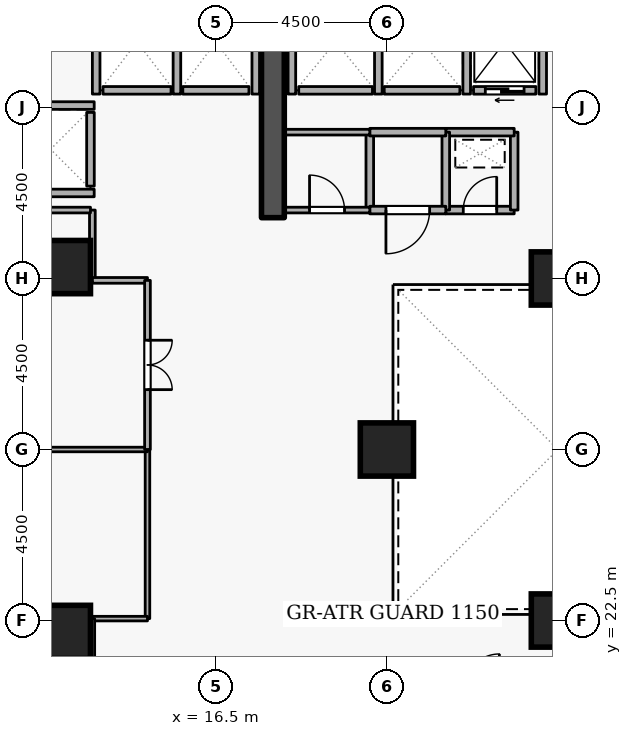
"""IFC4 building model, lengths in metres.
Left out: names, types, materials, properties, quantities, classifications, styles, units other than length and angle.
Written with IfcOpenShell. Run it as: python <this file> out.ifc"""

import sys

from ifc_helpers import new_model, si_unit, direction, frame, frame_2d, origin, origin_2d, place, context, subcontext, project, spatial, rectangle, extrude, element, fill, save


model = new_model("IFC4")
c1 = context("Model", 3, precision=1e-05, world=origin(), true_north=direction((0.0, 1.0)))
c2 = subcontext(c1, "Body", "Model", "MODEL_VIEW")
j1 = project(units=[si_unit("LENGTHUNIT", "METRE"), si_unit("PLANEANGLEUNIT", "RADIAN")], contexts=[c1])
p1 = place(None, origin())
s1 = spatial("IfcSite", under=j1, at=p1, CompositionType="ELEMENT")
p2 = place(p1, origin())
s2 = spatial("IfcBuilding", under=s1, at=p2, CompositionType="ELEMENT")
p3 = place(p2, frame((0.0, 0.0, 53.7)))
s3 = spatial("IfcBuildingStorey", under=s2, at=p3, CompositionType="ELEMENT", Elevation=53.7)
p4 = place(p3, frame((18.0, 33.1, 0.0), z_axis=(0.0, 0.0, 1.0), x_axis=(0.0, 1.0, 0.0)))
e1 = element("IfcWall", 1, at=p4, inside=s3, PredefinedType="SHEAR", context=c2, shape_type="SweptSolid", body=[
    extrude(rectangle(XDim=5.7, YDim=0.6, at=frame_2d((2.85, 0.0))), origin(), (0.0, 0.0, 1.0), 3.6),
])
for number, where, z_axis, x_axis in (
    (2, (12.5, 22.2, 0.0), (0.0, 0.0, 1.0), (1.0, 0.0, 0.0)),
    (3, (12.5, 31.8, 0.0), (0.0, 0.0, 1.0), (1.0, 0.0, 0.0)),
    (4, (25.5, 22.5, 0.0), (0.0, 0.0, 1.0), (1.0, 0.0, 0.0)),
    (5, (25.5, 31.5, 0.0), (0.0, 0.0, 1.0), (1.0, 0.0, 0.0)),
    (6, (21.0, 27.0, 0.0), (0.0, 0.0, 1.0), (1.0, 0.0, 0.0)),
):
    element("IfcColumn", number, at=place(p3, frame(where, z_axis=z_axis, x_axis=x_axis)), inside=s3, PredefinedType="COLUMN", context=c2, shape_type="SweptSolid", body=[
        extrude(rectangle(XDim=1.4, YDim=1.4, at=origin_2d()), origin(), (0.0, 0.0, 1.0), 3.6),
    ])
p5 = place(p3, frame((24.92, 36.45, 0.0), z_axis=(0.0, 0.0, 1.0), x_axis=(-1.0, 0.0, 0.0)))
e7 = element("IfcWall", 7, at=p5, inside=s3, PredefinedType="STANDARD", context=c2, shape_type="SweptSolid", body=[
    extrude(rectangle(XDim=1.64, YDim=0.2, at=frame_2d((0.82, 0.0))), origin(), (0.0, 0.0, 1.0), 3.34),
])
p6 = place(p5, frame((0.31, 0.0, 0.0)))
e8 = element("IfcOpeningElement", 8, at=p6, cuts=e7, PredefinedType="OPENING", context=c2, shape_type="SweptSolid", body=[
    extrude(rectangle(XDim=1.02, YDim=2.06, at=frame_2d((0.51, 1.03))), frame((0.0, 0.11, 0.0), z_axis=(0.0, -1.0, 0.0), x_axis=(1.0, 0.0, 0.0)), (0.0, 0.0, 1.0), 0.22),
])
p7 = place(p3, frame((22.92, 36.45, 0.0), z_axis=(0.0, 0.0, 1.0), x_axis=(-1.0, 0.0, 0.0)))
e9 = element("IfcWall", 9, at=p7, inside=s3, PredefinedType="STANDARD", context=c2, shape_type="SweptSolid", body=[
    extrude(rectangle(XDim=1.99, YDim=0.2, at=frame_2d((0.995, 0.0))), origin(), (0.0, 0.0, 1.0), 3.34),
])
p8 = place(p3, frame((20.62, 36.45, 0.0), z_axis=(0.0, 0.0, 1.0), x_axis=(-1.0, 0.0, 0.0)))
e10 = element("IfcWall", 10, at=p8, inside=s3, PredefinedType="STANDARD", context=c2, shape_type="SweptSolid", body=[
    extrude(rectangle(XDim=1.94, YDim=0.2, at=frame_2d((0.97, 0.0))), origin(), (0.0, 0.0, 1.0), 3.34),
])
p9 = place(p3, frame((17.37, 36.45, 0.0), z_axis=(0.0, 0.0, 1.0), x_axis=(-1.0, 0.0, 0.0)))
e11 = element("IfcWall", 11, at=p9, inside=s3, PredefinedType="STANDARD", context=c2, shape_type="SweptSolid", body=[
    extrude(rectangle(XDim=1.74, YDim=0.2, at=frame_2d((0.87, 0.0))), origin(), (0.0, 0.0, 1.0), 3.34),
])
p10 = place(p3, frame((15.32, 36.45, 0.0), z_axis=(0.0, 0.0, 1.0), x_axis=(-1.0, 0.0, 0.0)))
e12 = element("IfcWall", 12, at=p10, inside=s3, PredefinedType="STANDARD", context=c2, shape_type="SweptSolid", body=[
    extrude(rectangle(XDim=1.79, YDim=0.2, at=frame_2d((0.895, 0.0))), origin(), (0.0, 0.0, 1.0), 3.34),
])
p11 = place(p3, frame((13.2, 33.93, 0.0), z_axis=(0.0, 0.0, 1.0), x_axis=(0.0, 1.0, 0.0)))
e13 = element("IfcWall", 13, at=p11, inside=s3, PredefinedType="STANDARD", context=c2, shape_type="SweptSolid", body=[
    extrude(rectangle(XDim=1.94, YDim=0.2, at=frame_2d((0.97, 0.0))), origin(), (0.0, 0.0, 1.0), 3.34),
])
for number, where, z_axis, x_axis in (
    (14, (25.1, 36.352, 0.0), (0.0, 0.0, 1.0), (0.0, 1.0, 0.0)),
    (15, (23.1, 36.352, 0.0), (0.0, 0.0, 1.0), (0.0, 1.0, 0.0)),
    (16, (20.775, 36.352, 0.0), (0.0, 0.0, 1.0), (0.0, 1.0, 0.0)),
    (17, (18.5, 36.352, 0.0), (0.0, 0.0, 1.0), (0.0, 1.0, 0.0)),
):
    element("IfcWall", number, at=place(p3, frame(where, z_axis=z_axis, x_axis=x_axis)), inside=s3, PredefinedType="STANDARD", context=c2, shape_type="SweptSolid", body=[
        extrude(rectangle(XDim=2.436, YDim=0.2, at=frame_2d((1.218, 0.0))), origin(), (0.0, 0.0, 1.0), 3.34),
    ])
p12 = place(p3, frame((17.55, 36.352, 0.0), z_axis=(0.0, 0.0, 1.0), x_axis=(0.0, 1.0, 0.0)))
e18 = element("IfcWall", 18, at=p12, inside=s3, PredefinedType="STANDARD", context=c2, shape_type="SweptSolid", body=[
    extrude(rectangle(XDim=2.636, YDim=0.2, at=frame_2d((1.318, 0.0))), origin(), (0.0, 0.0, 1.0), 2.545),
])
for number, where, z_axis, x_axis in (
    (19, (15.475, 36.352, 0.0), (0.0, 0.0, 1.0), (0.0, 1.0, 0.0)),
    (20, (13.35, 36.352, 0.0), (0.0, 0.0, 1.0), (0.0, 1.0, 0.0)),
):
    element("IfcWall", number, at=place(p3, frame(where, z_axis=z_axis, x_axis=x_axis)), inside=s3, PredefinedType="STANDARD", context=c2, shape_type="SweptSolid", body=[
        extrude(rectangle(XDim=2.636, YDim=0.2, at=frame_2d((1.318, 0.0))), origin(), (0.0, 0.0, 1.0), 3.34),
    ])
for number, where, z_axis, x_axis in (
    (21, (11.002, 36.05, 0.0), (0.0, 0.0, 1.0), (1.0, 0.0, 0.0)),
    (22, (11.002, 33.75, 0.0), (0.0, 0.0, 1.0), (1.0, 0.0, 0.0)),
):
    element("IfcWall", number, at=place(p3, frame(where, z_axis=z_axis, x_axis=x_axis)), inside=s3, PredefinedType="STANDARD", context=c2, shape_type="SweptSolid", body=[
        extrude(rectangle(XDim=2.296, YDim=0.2, at=frame_2d((1.148, 0.0))), origin(), (0.0, 0.0, 1.0), 3.34),
    ])
p13 = place(p3, frame((22.55, 33.3, 0.0), z_axis=(0.0, 0.0, 1.0), x_axis=(1.0, 0.0, 0.0)))
e23 = element("IfcWall", 23, at=p13, inside=s3, PredefinedType="STANDARD", context=c2, shape_type="SweptSolid", body=[
    extrude(rectangle(XDim=1.8, YDim=0.2, at=frame_2d((0.9, 0.0))), origin(), (0.0, 0.0, 1.0), 3.34),
])
p14 = place(p13, frame((0.46, 0.0, 0.0)))
e24 = element("IfcOpeningElement", 24, at=p14, cuts=e23, PredefinedType="OPENING", context=c2, shape_type="SweptSolid", body=[
    extrude(rectangle(XDim=0.88, YDim=2.04, at=frame_2d((0.44, 1.02))), frame((0.0, 0.11, 0.0), z_axis=(0.0, -1.0, 0.0), x_axis=(1.0, 0.0, 0.0)), (0.0, 0.0, 1.0), 0.22),
])
p15 = place(p3, frame((24.35, 33.3, 0.0), z_axis=(0.0, 0.0, 1.0), x_axis=(0.0, 1.0, 0.0)))
e25 = element("IfcWall", 25, at=p15, inside=s3, PredefinedType="STANDARD", context=c2, shape_type="SweptSolid", body=[
    extrude(rectangle(XDim=2.05, YDim=0.2, at=frame_2d((1.025, 0.0))), origin(), (0.0, 0.0, 1.0), 3.34),
])
p16 = place(p3, frame((24.35, 35.35, 0.0), z_axis=(0.0, 0.0, 1.0), x_axis=(-1.0, 0.0, 0.0)))
e26 = element("IfcWall", 26, at=p16, inside=s3, PredefinedType="STANDARD", context=c2, shape_type="SweptSolid", body=[
    extrude(rectangle(XDim=1.8, YDim=0.2, at=frame_2d((0.9, 0.0))), origin(), (0.0, 0.0, 1.0), 3.34),
])
for number, where, z_axis, x_axis in (
    (27, (22.55, 35.35, 0.0), (0.0, 0.0, 1.0), (0.0, -1.0, 0.0)),
    (28, (20.55, 33.3, 0.0), (0.0, 0.0, 1.0), (0.0, 1.0, 0.0)),
):
    element("IfcWall", number, at=place(p3, frame(where, z_axis=z_axis, x_axis=x_axis)), inside=s3, PredefinedType="STANDARD", context=c2, shape_type="SweptSolid", body=[
        extrude(rectangle(XDim=2.05, YDim=0.2, at=frame_2d((1.025, 0.0))), origin(), (0.0, 0.0, 1.0), 3.34),
    ])
p17 = place(p3, frame((20.55, 35.35, 0.0), z_axis=(0.0, 0.0, 1.0), x_axis=(1.0, 0.0, 0.0)))
e29 = element("IfcWall", 29, at=p17, inside=s3, PredefinedType="STANDARD", context=c2, shape_type="SweptSolid", body=[
    extrude(rectangle(XDim=2.0, YDim=0.2, at=frame_2d((1.0, 0.0))), origin(), (0.0, 0.0, 1.0), 3.34),
])
p18 = place(p3, frame((22.55, 33.3, 0.0), z_axis=(0.0, 0.0, 1.0), x_axis=(-1.0, 0.0, 0.0)))
e30 = element("IfcWall", 30, at=p18, inside=s3, PredefinedType="STANDARD", context=c2, shape_type="SweptSolid", body=[
    extrude(rectangle(XDim=2.0, YDim=0.2, at=frame_2d((1.0, 0.0))), origin(), (0.0, 0.0, 1.0), 3.34),
])
p19 = place(p18, frame((0.425, 0.0, 0.0)))
e31 = element("IfcOpeningElement", 31, at=p19, cuts=e30, PredefinedType="OPENING", context=c2, shape_type="SweptSolid", body=[
    extrude(rectangle(XDim=1.15, YDim=2.1, at=frame_2d((0.575, 1.05))), frame((0.0, 0.11, 0.0), z_axis=(0.0, -1.0, 0.0), x_axis=(1.0, 0.0, 0.0)), (0.0, 0.0, 1.0), 0.22),
])
p20 = place(p3, frame((18.3, 33.3, 0.0), z_axis=(0.0, 0.0, 1.0), x_axis=(1.0, 0.0, 0.0)))
e32 = element("IfcWall", 32, at=p20, inside=s3, PredefinedType="PARTITIONING", context=c2, shape_type="SweptSolid", body=[
    extrude(rectangle(XDim=2.25, YDim=0.15, at=frame_2d((1.125, 0.0))), origin(), (0.0, 0.0, 1.0), 3.34),
])
p21 = place(p20, frame((0.665, 0.0, 0.0)))
e33 = element("IfcOpeningElement", 33, at=p21, cuts=e32, PredefinedType="OPENING", context=c2, shape_type="SweptSolid", body=[
    extrude(rectangle(XDim=0.92, YDim=2.08, at=frame_2d((0.46, 1.04))), frame((0.0, 0.085, 0.0), z_axis=(0.0, -1.0, 0.0), x_axis=(1.0, 0.0, 0.0)), (0.0, 0.0, 1.0), 0.17),
])
p22 = place(p3, frame((20.55, 35.35, 0.0), z_axis=(0.0, 0.0, 1.0), x_axis=(-1.0, 0.0, 0.0)))
e34 = element("IfcWall", 34, at=p22, inside=s3, PredefinedType="PARTITIONING", context=c2, shape_type="SweptSolid", body=[
    extrude(rectangle(XDim=2.25, YDim=0.15, at=frame_2d((1.125, 0.0))), origin(), (0.0, 0.0, 1.0), 3.34),
])
p23 = place(p3, frame((14.7, 27.0, 0.0), z_axis=(0.0, 0.0, 1.0), x_axis=(0.0, -1.0, 0.0)))
e35 = element("IfcWall", 35, at=p23, inside=s3, PredefinedType="PARTITIONING", context=c2, shape_type="SweptSolid", body=[
    extrude(rectangle(XDim=4.45, YDim=0.12, at=frame_2d((2.225, 0.0))), origin(), (0.0, 0.0, 1.0), 3.34),
])
p24 = place(p3, frame((14.7, 22.55, 0.0), z_axis=(0.0, 0.0, 1.0), x_axis=(-1.0, 0.0, 0.0)))
e36 = element("IfcWall", 36, at=p24, inside=s3, PredefinedType="PARTITIONING", context=c2, shape_type="SweptSolid", body=[
    extrude(rectangle(XDim=1.45, YDim=0.12, at=frame_2d((0.725, 0.0))), origin(), (0.0, 0.0, 1.0), 3.34),
])
p25 = place(p3, frame((13.25, 22.55, 0.0), z_axis=(0.0, 0.0, 1.0), x_axis=(0.0, -1.0, 0.0)))
e37 = element("IfcWall", 37, at=p25, inside=s3, PredefinedType="PARTITIONING", context=c2, shape_type="SweptSolid", body=[
    extrude(rectangle(XDim=1.85, YDim=0.12, at=frame_2d((0.925, 0.0))), origin(), (0.0, 0.0, 1.0), 3.34),
])
p26 = place(p3, frame((7.28, 27.0, 0.0), z_axis=(0.0, 0.0, 1.0), x_axis=(1.0, 0.0, 0.0)))
e38 = element("IfcWall", 38, at=p26, inside=s3, PredefinedType="PARTITIONING", context=c2, shape_type="SweptSolid", body=[
    extrude(rectangle(XDim=7.42, YDim=0.12, at=frame_2d((3.71, 0.0))), origin(), (0.0, 0.0, 1.0), 2.932),
])
p27 = place(p3, frame((13.25, 33.3, 0.0), z_axis=(0.0, 0.0, 1.0), x_axis=(0.0, -1.0, 0.0)))
e39 = element("IfcWall", 39, at=p27, inside=s3, PredefinedType="PARTITIONING", context=c2, shape_type="SweptSolid", body=[
    extrude(rectangle(XDim=1.85, YDim=0.15, at=frame_2d((0.925, 0.0))), origin(), (0.0, 0.0, 1.0), 3.34),
])
p28 = place(p3, frame((13.25, 31.45, 0.0), z_axis=(0.0, 0.0, 1.0), x_axis=(1.0, 0.0, 0.0)))
e40 = element("IfcWall", 40, at=p28, inside=s3, PredefinedType="PARTITIONING", context=c2, shape_type="SweptSolid", body=[
    extrude(rectangle(XDim=1.45, YDim=0.15, at=frame_2d((0.725, 0.0))), origin(), (0.0, 0.0, 1.0), 3.34),
])
p29 = place(p3, frame((14.7, 31.45, 0.0), z_axis=(0.0, 0.0, 1.0), x_axis=(0.0, -1.0, 0.0)))
e41 = element("IfcWall", 41, at=p29, inside=s3, PredefinedType="PARTITIONING", context=c2, shape_type="SweptSolid", body=[
    extrude(rectangle(XDim=4.45, YDim=0.15, at=frame_2d((2.225, 0.0))), origin(), (0.0, 0.0, 1.0), 3.34),
])
p30 = place(p29, frame((1.575, 0.0, 0.0)))
e42 = element("IfcOpeningElement", 42, at=p30, cuts=e41, PredefinedType="OPENING", context=c2, shape_type="SweptSolid", body=[
    extrude(rectangle(XDim=1.3, YDim=2.12, at=frame_2d((0.65, 1.06))), frame((0.0, 0.085, 0.0), z_axis=(0.0, -1.0, 0.0), x_axis=(1.0, 0.0, 0.0)), (0.0, 0.0, 1.0), 0.17),
])
p31 = place(p3, frame((10.9, 33.3, 0.0), z_axis=(0.0, 0.0, 1.0), x_axis=(1.0, 0.0, 0.0)))
e43 = element("IfcWall", 43, at=p31, inside=s3, PredefinedType="PARTITIONING", context=c2, shape_type="SweptSolid", body=[
    extrude(rectangle(XDim=2.3, YDim=0.15, at=frame_2d((1.15, 0.0))), origin(), (0.0, 0.0, 1.0), 3.34),
])
p32 = place(p6, origin())
e44 = element("IfcDoor", 44, at=p32, inside=s3, OperationType="SLIDING_TO_LEFT", PredefinedType="DOOR", context=c2, shape_type="SweptSolid", body=[
    extrude(rectangle(XDim=1.02, YDim=2.06, at=frame_2d((0.51, 1.03))), frame((0.0, 0.025, 0.0), z_axis=(0.0, -1.0, 0.0), x_axis=(1.0, 0.0, 0.0)), (0.0, 0.0, 1.0), 0.05),
])
fill(e8, e44)
p33 = place(p14, origin())
e45 = element("IfcDoor", 45, at=p33, inside=s3, OperationType="SINGLE_SWING_RIGHT", PredefinedType="DOOR", context=c2, shape_type="SweptSolid", body=[
    extrude(rectangle(XDim=0.88, YDim=2.04, at=frame_2d((0.44, 1.02))), frame((0.0, 0.025, 0.0), z_axis=(0.0, -1.0, 0.0), x_axis=(1.0, 0.0, 0.0)), (0.0, 0.0, 1.0), 0.05),
])
fill(e24, e45)
p34 = place(p21, origin())
e46 = element("IfcDoor", 46, at=p34, inside=s3, OperationType="SINGLE_SWING_LEFT", PredefinedType="DOOR", context=c2, shape_type="SweptSolid", body=[
    extrude(rectangle(XDim=0.92, YDim=2.08, at=frame_2d((0.46, 1.04))), frame((0.0, 0.025, 0.0), z_axis=(0.0, -1.0, 0.0), x_axis=(1.0, 0.0, 0.0)), (0.0, 0.0, 1.0), 0.05),
])
fill(e33, e46)
p35 = place(p19, origin())
e47 = element("IfcDoor", 47, at=p35, inside=s3, OperationType="SINGLE_SWING_RIGHT", PredefinedType="DOOR", context=c2, shape_type="SweptSolid", body=[
    extrude(rectangle(XDim=1.15, YDim=2.1, at=frame_2d((0.575, 1.05))), frame((0.0, 0.025, 0.0), z_axis=(0.0, -1.0, 0.0), x_axis=(1.0, 0.0, 0.0)), (0.0, 0.0, 1.0), 0.05),
])
fill(e31, e47)
p36 = place(p30, origin())
e48 = element("IfcDoor", 48, at=p36, inside=s3, OperationType="DOUBLE_DOOR_SINGLE_SWING", PredefinedType="DOOR", context=c2, shape_type="SweptSolid", body=[
    extrude(rectangle(XDim=1.3, YDim=2.12, at=frame_2d((0.65, 1.06))), frame((0.0, 0.025, 0.0), z_axis=(0.0, -1.0, 0.0), x_axis=(1.0, 0.0, 0.0)), (0.0, 0.0, 1.0), 0.05),
])
fill(e42, e48)
save(model, sys.argv[1])
